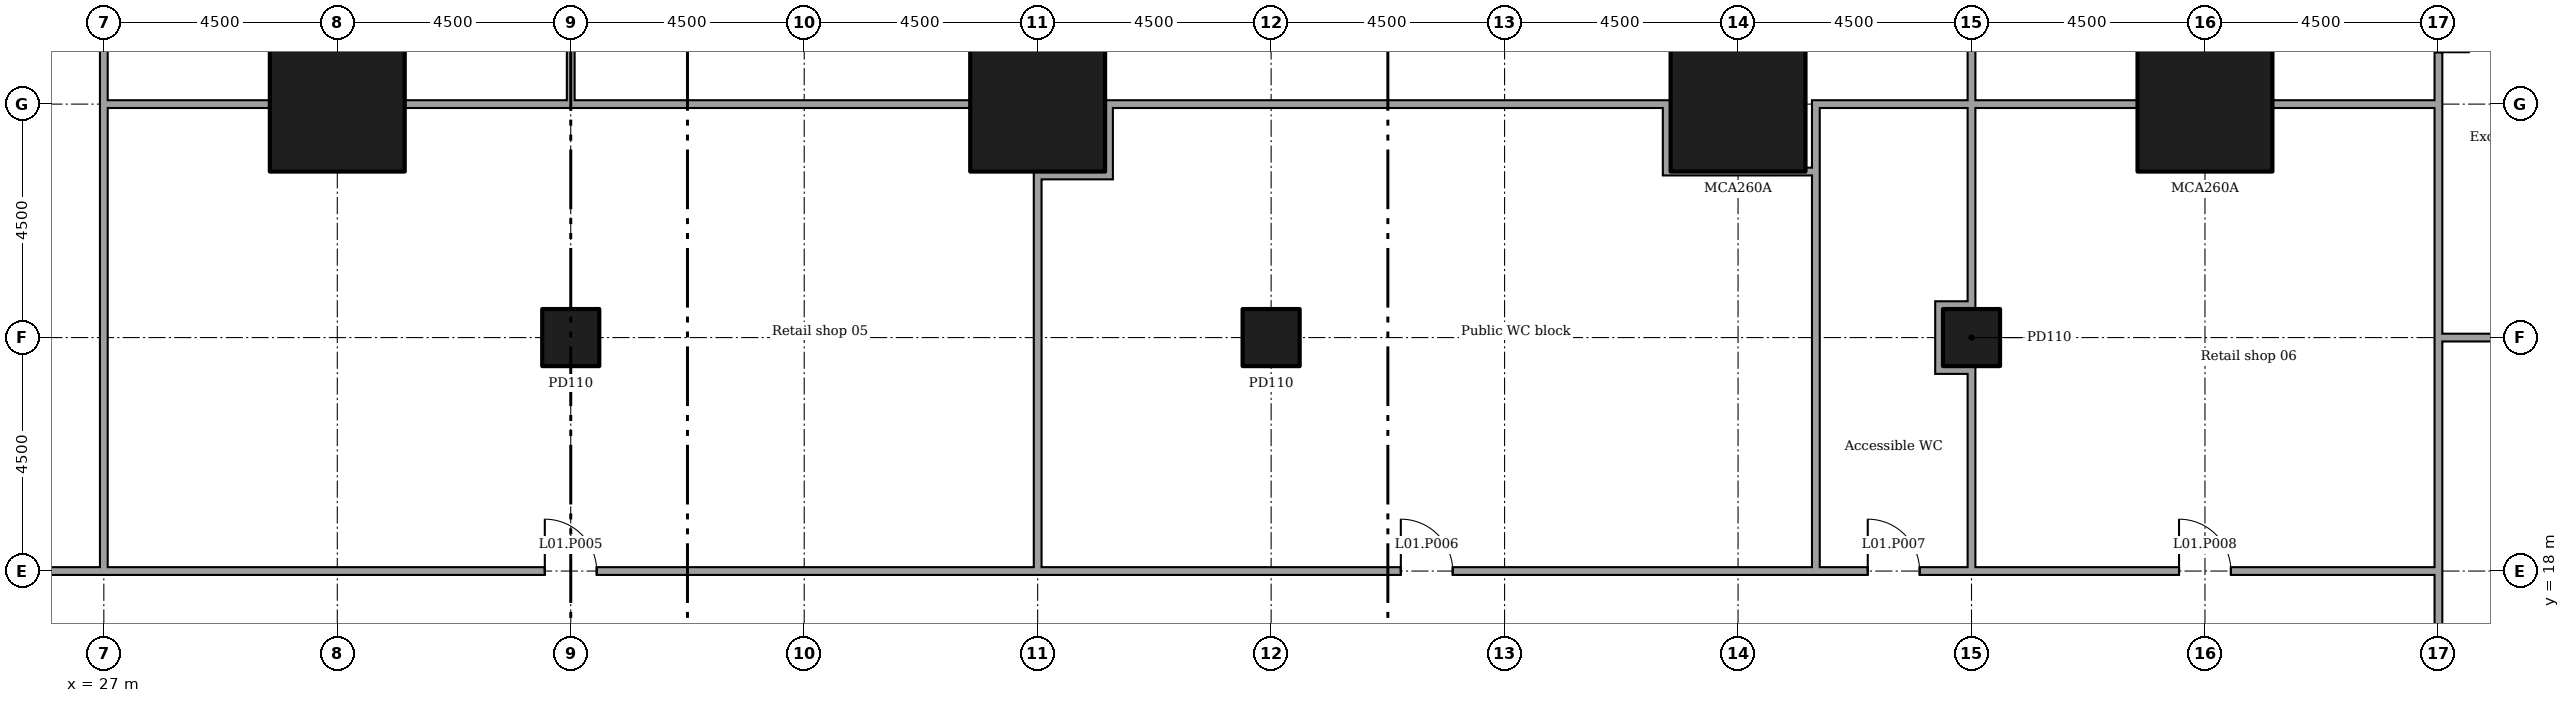
"""IFC4 building model, lengths in metres.
Left out: names, types, materials, properties, quantities, classifications, styles, units other than length and angle.
Written with IfcOpenShell. Run it as: python <this file> out.ifc"""

import sys

from ifc_helpers import new_model, si_unit, direction, frame, frame_2d, origin, origin_2d, place, context, subcontext, project, spatial, rectangle, extrude, element, fill, save


model = new_model("IFC4")
c1 = context("Model", 3, precision=1e-05, world=origin(), true_north=direction((0.0, 1.0)))
c2 = subcontext(c1, "Body", "Model", "MODEL_VIEW")
j1 = project(units=[si_unit("LENGTHUNIT", "METRE"), si_unit("PLANEANGLEUNIT", "RADIAN")], contexts=[c1])
p1 = place(None, origin())
s1 = spatial("IfcSite", under=j1, at=p1, CompositionType="ELEMENT")
p2 = place(p1, origin())
s2 = spatial("IfcBuilding", under=s1, at=p2, CompositionType="ELEMENT")
p3 = place(p2, frame((0.0, 0.0, 6.0)))
s3 = spatial("IfcBuildingStorey", under=s2, at=p3, CompositionType="ELEMENT", Elevation=6.0)
for number, where in (
    (1, (31.5, 27.0, 0.0)),
    (2, (45.0, 27.0, 0.0)),
    (3, (58.5, 27.0, 0.0)),
    (4, (67.5, 27.0, 0.0)),
):
    element("IfcColumn", number, at=place(p3, frame(where)), inside=s3, PredefinedType="COLUMN", context=c2, shape_type="SweptSolid", body=[
        extrude(rectangle(XDim=2.6, YDim=2.6, at=origin_2d()), origin(), (0.0, 0.0, 1.0), 5.5),
    ])
for number, where in (
    (5, (36.0, 22.5, 0.0)),
    (6, (49.5, 22.5, 0.0)),
    (7, (63.0, 22.5, 0.0)),
):
    element("IfcColumn", number, at=place(p3, frame(where)), inside=s3, PredefinedType="COLUMN", context=c2, shape_type="SweptSolid", body=[
        extrude(rectangle(XDim=1.1, YDim=1.1, at=origin_2d()), origin(), (0.0, 0.0, 1.0), 5.5),
    ])
p4 = place(p3, frame((72.0, 9.3, 0.0), z_axis=(0.0, 0.0, 1.0), x_axis=(0.0, 1.0, 0.0)))
e8 = element("IfcWall", 8, at=p4, inside=s3, PredefinedType="PARTITIONING", context=c2, shape_type="SweptSolid", body=[
    extrude(rectangle(XDim=8.775, YDim=0.15, at=frame_2d((4.387, 0.0))), origin(), (0.0, 0.0, 1.0), 5.05),
])
p5 = place(p4, frame((3.45, 0.0, 0.0)))
e9 = element("IfcOpeningElement", 9, at=p5, cuts=e8, PredefinedType="OPENING", context=c2, shape_type="SweptSolid", body=[
    extrude(rectangle(XDim=1.8, YDim=2.1, at=frame_2d((0.9, 1.05))), frame((0.0, 0.085, 0.0), z_axis=(0.0, -1.0, 0.0), x_axis=(1.0, 0.0, 0.0)), (0.0, 0.0, 1.0), 0.17),
])
p6 = place(p3, frame((72.0, 18.0, 0.0), z_axis=(0.0, 0.0, 1.0), x_axis=(0.0, 1.0, 0.0)))
e10 = element("IfcWall", 10, at=p6, inside=s3, PredefinedType="PARTITIONING", context=c2, shape_type="SweptSolid", body=[
    extrude(rectangle(XDim=4.575, YDim=0.15, at=frame_2d((2.288, 0.0))), origin(), (0.0, 0.0, 1.0), 5.05),
])
p7 = place(p3, frame((72.075, 22.5, 0.0)))
e11 = element("IfcWall", 11, at=p7, inside=s3, PredefinedType="PARTITIONING", context=c2, shape_type="SweptSolid", body=[
    extrude(rectangle(XDim=3.88, YDim=0.15, at=frame_2d((1.94, 0.0))), origin(), (0.0, 0.0, 1.0), 5.05),
])
p8 = place(p7, frame((1.325, 0.0, 0.0)))
e12 = element("IfcOpeningElement", 12, at=p8, cuts=e11, PredefinedType="OPENING", context=c2, shape_type="SweptSolid", body=[
    extrude(rectangle(XDim=1.2, YDim=2.1, at=frame_2d((0.6, 1.05))), frame((0.0, 0.085, 0.0), z_axis=(0.0, -1.0, 0.0), x_axis=(1.0, 0.0, 0.0)), (0.0, 0.0, 1.0), 0.17),
])
p9 = place(p3, frame((18.075, 18.0, 0.0)))
e13 = element("IfcWall", 13, at=p9, inside=s3, PredefinedType="PARTITIONING", context=c2, shape_type="SweptSolid", body=[
    extrude(rectangle(XDim=9.0, YDim=0.15, at=frame_2d((4.5, 0.0))), origin(), (0.0, 0.0, 1.0), 5.05),
])
p10 = place(p3, frame((27.0, 18.0, 0.0)))
e14 = element("IfcWall", 14, at=p10, inside=s3, PredefinedType="PARTITIONING", context=c2, shape_type="SweptSolid", body=[
    extrude(rectangle(XDim=18.075, YDim=0.15, at=frame_2d((9.038, 0.0))), origin(), (0.0, 0.0, 1.0), 5.05),
])
p11 = place(p10, frame((8.5, 0.0, 0.0)))
e15 = element("IfcOpeningElement", 15, at=p11, cuts=e14, PredefinedType="OPENING", context=c2, shape_type="SweptSolid", body=[
    extrude(rectangle(XDim=1.0, YDim=2.1, at=frame_2d((0.5, 1.05))), frame((0.0, 0.085, 0.0), z_axis=(0.0, -1.0, 0.0), x_axis=(1.0, 0.0, 0.0)), (0.0, 0.0, 1.0), 0.17),
])
p12 = place(p3, frame((45.0, 18.0, 0.0)))
e16 = element("IfcWall", 16, at=p12, inside=s3, PredefinedType="PARTITIONING", context=c2, shape_type="SweptSolid", body=[
    extrude(rectangle(XDim=15.075, YDim=0.15, at=frame_2d((7.538, 0.0))), origin(), (0.0, 0.0, 1.0), 5.05),
])
p13 = place(p12, frame((7.0, 0.0, 0.0)))
e17 = element("IfcOpeningElement", 17, at=p13, cuts=e16, PredefinedType="OPENING", context=c2, shape_type="SweptSolid", body=[
    extrude(rectangle(XDim=1.0, YDim=2.1, at=frame_2d((0.5, 1.05))), frame((0.0, 0.085, 0.0), z_axis=(0.0, -1.0, 0.0), x_axis=(1.0, 0.0, 0.0)), (0.0, 0.0, 1.0), 0.17),
])
p14 = place(p3, frame((60.0, 18.0, 0.0)))
e18 = element("IfcWall", 18, at=p14, inside=s3, PredefinedType="PARTITIONING", context=c2, shape_type="SweptSolid", body=[
    extrude(rectangle(XDim=3.075, YDim=0.15, at=frame_2d((1.538, 0.0))), origin(), (0.0, 0.0, 1.0), 5.05),
])
p15 = place(p14, frame((1.0, 0.0, 0.0)))
e19 = element("IfcOpeningElement", 19, at=p15, cuts=e18, PredefinedType="OPENING", context=c2, shape_type="SweptSolid", body=[
    extrude(rectangle(XDim=1.0, YDim=2.1, at=frame_2d((0.5, 1.05))), frame((0.0, 0.085, 0.0), z_axis=(0.0, -1.0, 0.0), x_axis=(1.0, 0.0, 0.0)), (0.0, 0.0, 1.0), 0.17),
])
p16 = place(p3, frame((63.0, 18.0, 0.0)))
e20 = element("IfcWall", 20, at=p16, inside=s3, PredefinedType="PARTITIONING", context=c2, shape_type="SweptSolid", body=[
    extrude(rectangle(XDim=8.925, YDim=0.15, at=frame_2d((4.462, 0.0))), origin(), (0.0, 0.0, 1.0), 5.05),
])
p17 = place(p16, frame((4.0, 0.0, 0.0)))
e21 = element("IfcOpeningElement", 21, at=p17, cuts=e20, PredefinedType="OPENING", context=c2, shape_type="SweptSolid", body=[
    extrude(rectangle(XDim=1.0, YDim=2.1, at=frame_2d((0.5, 1.05))), frame((0.0, 0.085, 0.0), z_axis=(0.0, -1.0, 0.0), x_axis=(1.0, 0.0, 0.0)), (0.0, 0.0, 1.0), 0.17),
])
p18 = place(p3, frame((27.0, 18.075, 0.0), z_axis=(0.0, 0.0, 1.0), x_axis=(0.0, 1.0, 0.0)))
e22 = element("IfcWall", 22, at=p18, inside=s3, PredefinedType="PARTITIONING", context=c2, shape_type="SweptSolid", body=[
    extrude(rectangle(XDim=9.0, YDim=0.15, at=frame_2d((4.5, 0.0))), origin(), (0.0, 0.0, 1.0), 5.05),
])
p19 = place(p3, frame((27.0, 27.0, 0.0), z_axis=(0.0, 0.0, 1.0), x_axis=(0.0, 1.0, 0.0)))
e23 = element("IfcWall", 23, at=p19, inside=s3, PredefinedType="PARTITIONING", context=c2, shape_type="SweptSolid", body=[
    extrude(rectangle(XDim=3.205, YDim=0.15, at=frame_2d((1.603, 0.0))), origin(), (0.0, 0.0, 1.0), 5.05),
])
p20 = place(p3, frame((45.0, 18.075, 0.0), z_axis=(0.0, 0.0, 1.0), x_axis=(0.0, 1.0, 0.0)))
e24 = element("IfcWall", 24, at=p20, inside=s3, PredefinedType="PARTITIONING", context=c2, shape_type="SweptSolid", body=[
    extrude(rectangle(XDim=7.625, YDim=0.15, at=frame_2d((3.812, 0.0))), origin(), (0.0, 0.0, 1.0), 5.05),
])
p21 = place(p3, frame((27.075, 27.0, 0.0)))
e25 = element("IfcWall", 25, at=p21, inside=s3, PredefinedType="PARTITIONING", context=c2, shape_type="SweptSolid", body=[
    extrude(rectangle(XDim=3.13, YDim=0.15, at=frame_2d((1.565, 0.0))), origin(), (0.0, 0.0, 1.0), 5.05),
])
p22 = place(p3, frame((32.795, 27.0, 0.0)))
e26 = element("IfcWall", 26, at=p22, inside=s3, PredefinedType="PARTITIONING", context=c2, shape_type="SweptSolid", body=[
    extrude(rectangle(XDim=3.28, YDim=0.15, at=frame_2d((1.64, 0.0))), origin(), (0.0, 0.0, 1.0), 5.05),
])
p23 = place(p3, frame((36.0, 27.0, 0.0)))
e27 = element("IfcWall", 27, at=p23, inside=s3, PredefinedType="PARTITIONING", context=c2, shape_type="SweptSolid", body=[
    extrude(rectangle(XDim=7.705, YDim=0.15, at=frame_2d((3.853, 0.0))), origin(), (0.0, 0.0, 1.0), 5.05),
])
p24 = place(p3, frame((60.0, 18.075, 0.0), z_axis=(0.0, 0.0, 1.0), x_axis=(0.0, 1.0, 0.0)))
e28 = element("IfcWall", 28, at=p24, inside=s3, PredefinedType="PARTITIONING", context=c2, shape_type="SweptSolid", body=[
    extrude(rectangle(XDim=7.7, YDim=0.15, at=frame_2d((3.85, 0.0))), origin(), (0.0, 0.0, 1.0), 5.05),
])
p25 = place(p3, frame((46.375, 25.55, 0.0), z_axis=(0.0, 0.0, 1.0), x_axis=(0.0, 1.0, 0.0)))
e29 = element("IfcWall", 29, at=p25, inside=s3, PredefinedType="PARTITIONING", context=c2, shape_type="SweptSolid", body=[
    extrude(rectangle(XDim=1.525, YDim=0.15, at=frame_2d((0.762, 0.0))), origin(), (0.0, 0.0, 1.0), 5.05),
])
p26 = place(p3, frame((57.125, 25.625, 0.0), z_axis=(0.0, 0.0, 1.0), x_axis=(0.0, 1.0, 0.0)))
e30 = element("IfcWall", 30, at=p26, inside=s3, PredefinedType="PARTITIONING", context=c2, shape_type="SweptSolid", body=[
    extrude(rectangle(XDim=1.45, YDim=0.15, at=frame_2d((0.725, 0.0))), origin(), (0.0, 0.0, 1.0), 5.05),
])
p27 = place(p3, frame((45.075, 25.625, 0.0)))
e31 = element("IfcWall", 31, at=p27, inside=s3, PredefinedType="PARTITIONING", context=c2, shape_type="SweptSolid", body=[
    extrude(rectangle(XDim=1.225, YDim=0.15, at=frame_2d((0.613, 0.0))), origin(), (0.0, 0.0, 1.0), 5.05),
])
p28 = place(p3, frame((57.2, 25.7, 0.0)))
e32 = element("IfcWall", 32, at=p28, inside=s3, PredefinedType="PARTITIONING", context=c2, shape_type="SweptSolid", body=[
    extrude(rectangle(XDim=2.725, YDim=0.15, at=frame_2d((1.363, 0.0))), origin(), (0.0, 0.0, 1.0), 5.05),
])
p29 = place(p3, frame((46.45, 27.0, 0.0)))
e33 = element("IfcWall", 33, at=p29, inside=s3, PredefinedType="PARTITIONING", context=c2, shape_type="SweptSolid", body=[
    extrude(rectangle(XDim=10.6, YDim=0.15, at=frame_2d((5.3, 0.0))), origin(), (0.0, 0.0, 1.0), 5.05),
])
p30 = place(p3, frame((62.375, 21.8, 0.0), z_axis=(0.0, 0.0, 1.0), x_axis=(0.0, 1.0, 0.0)))
e34 = element("IfcWall", 34, at=p30, inside=s3, PredefinedType="PARTITIONING", context=c2, shape_type="SweptSolid", body=[
    extrude(rectangle(XDim=1.4, YDim=0.15, at=frame_2d((0.7, 0.0))), origin(), (0.0, 0.0, 1.0), 5.05),
])
p31 = place(p3, frame((63.0, 18.075, 0.0), z_axis=(0.0, 0.0, 1.0), x_axis=(0.0, 1.0, 0.0)))
e35 = element("IfcWall", 35, at=p31, inside=s3, PredefinedType="PARTITIONING", context=c2, shape_type="SweptSolid", body=[
    extrude(rectangle(XDim=3.875, YDim=0.15, at=frame_2d((1.938, 0.0))), origin(), (0.0, 0.0, 1.0), 5.05),
])
p32 = place(p3, frame((63.0, 23.05, 0.0), z_axis=(0.0, 0.0, 1.0), x_axis=(0.0, 1.0, 0.0)))
e36 = element("IfcWall", 36, at=p32, inside=s3, PredefinedType="PARTITIONING", context=c2, shape_type="SweptSolid", body=[
    extrude(rectangle(XDim=4.025, YDim=0.15, at=frame_2d((2.012, 0.0))), origin(), (0.0, 0.0, 1.0), 5.05),
])
for number, where in (
    (37, (62.45, 21.875, 0.0)),
    (38, (62.45, 23.125, 0.0)),
):
    element("IfcWall", number, at=place(p3, frame(where)), inside=s3, PredefinedType="PARTITIONING", context=c2, shape_type="SweptSolid", body=[
        extrude(rectangle(XDim=0.475, YDim=0.15, at=frame_2d((0.238, 0.0))), origin(), (0.0, 0.0, 1.0), 5.05),
    ])
p33 = place(p3, frame((60.0, 25.7, 0.0), z_axis=(0.0, 0.0, 1.0), x_axis=(0.0, 1.0, 0.0)))
e39 = element("IfcWall", 39, at=p33, inside=s3, PredefinedType="PARTITIONING", context=c2, shape_type="SweptSolid", body=[
    extrude(rectangle(XDim=1.375, YDim=0.15, at=frame_2d((0.688, 0.0))), origin(), (0.0, 0.0, 1.0), 5.05),
])
p34 = place(p3, frame((60.075, 27.0, 0.0)))
e40 = element("IfcWall", 40, at=p34, inside=s3, PredefinedType="PARTITIONING", context=c2, shape_type="SweptSolid", body=[
    extrude(rectangle(XDim=3.0, YDim=0.15, at=frame_2d((1.5, 0.0))), origin(), (0.0, 0.0, 1.0), 5.05),
])
p35 = place(p3, frame((63.075, 27.0, 0.0)))
e41 = element("IfcWall", 41, at=p35, inside=s3, PredefinedType="PARTITIONING", context=c2, shape_type="SweptSolid", body=[
    extrude(rectangle(XDim=3.13, YDim=0.15, at=frame_2d((1.565, 0.0))), origin(), (0.0, 0.0, 1.0), 5.05),
])
p36 = place(p3, frame((68.795, 27.0, 0.0)))
e42 = element("IfcWall", 42, at=p36, inside=s3, PredefinedType="PARTITIONING", context=c2, shape_type="SweptSolid", body=[
    extrude(rectangle(XDim=3.28, YDim=0.15, at=frame_2d((1.64, 0.0))), origin(), (0.0, 0.0, 1.0), 5.05),
])
p37 = place(p3, frame((72.0, 22.5, 0.0), z_axis=(0.0, 0.0, 1.0), x_axis=(0.0, 1.0, 0.0)))
e43 = element("IfcWall", 43, at=p37, inside=s3, PredefinedType="PARTITIONING", context=c2, shape_type="SweptSolid", body=[
    extrude(rectangle(XDim=4.425, YDim=0.15, at=frame_2d((2.212, 0.0))), origin(), (0.0, 0.0, 1.0), 5.05),
])
p38 = place(p3, frame((63.0, 27.075, 0.0), z_axis=(0.0, 0.0, 1.0), x_axis=(0.0, 1.0, 0.0)))
e44 = element("IfcWall", 44, at=p38, inside=s3, PredefinedType="PARTITIONING", context=c2, shape_type="SweptSolid", body=[
    extrude(rectangle(XDim=9.0, YDim=0.15, at=frame_2d((4.5, 0.0))), origin(), (0.0, 0.0, 1.0), 5.05),
])
p39 = place(p3, frame((72.0, 27.0, 0.0), z_axis=(0.0, 0.0, 1.0), x_axis=(0.0, 1.0, 0.0)))
e45 = element("IfcWall", 45, at=p39, inside=s3, PredefinedType="PARTITIONING", context=c2, shape_type="SweptSolid", body=[
    extrude(rectangle(XDim=3.205, YDim=0.15, at=frame_2d((1.603, 0.0))), origin(), (0.0, 0.0, 1.0), 5.05),
])
p40 = place(p39, frame((1.0, 0.0, 0.0)))
e46 = element("IfcOpeningElement", 46, at=p40, cuts=e45, PredefinedType="OPENING", context=c2, shape_type="SweptSolid", body=[
    extrude(rectangle(XDim=1.2, YDim=2.1, at=frame_2d((0.6, 1.05))), frame((0.0, 0.085, 0.0), z_axis=(0.0, -1.0, 0.0), x_axis=(1.0, 0.0, 0.0)), (0.0, 0.0, 1.0), 0.17),
])
p41 = place(p3, frame((36.0, 27.075, 0.0), z_axis=(0.0, 0.0, 1.0), x_axis=(0.0, 1.0, 0.0)))
e47 = element("IfcWall", 47, at=p41, inside=s3, PredefinedType="PARTITIONING", context=c2, shape_type="SweptSolid", body=[
    extrude(rectangle(XDim=9.0, YDim=0.15, at=frame_2d((4.5, 0.0))), origin(), (0.0, 0.0, 1.0), 5.05),
])
p42 = place(p11, origin())
e48 = element("IfcDoor", 48, at=p42, inside=s3, OperationType="SINGLE_SWING_RIGHT", PredefinedType="DOOR", context=c2, shape_type="SweptSolid", body=[
    extrude(rectangle(XDim=1.0, YDim=2.1, at=frame_2d((0.5, 1.05))), frame((0.0, 0.025, 0.0), z_axis=(0.0, -1.0, 0.0), x_axis=(1.0, 0.0, 0.0)), (0.0, 0.0, 1.0), 0.05),
])
fill(e15, e48)
p43 = place(p13, origin())
e49 = element("IfcDoor", 49, at=p43, inside=s3, OperationType="SINGLE_SWING_RIGHT", PredefinedType="DOOR", context=c2, shape_type="SweptSolid", body=[
    extrude(rectangle(XDim=1.0, YDim=2.1, at=frame_2d((0.5, 1.05))), frame((0.0, 0.025, 0.0), z_axis=(0.0, -1.0, 0.0), x_axis=(1.0, 0.0, 0.0)), (0.0, 0.0, 1.0), 0.05),
])
fill(e17, e49)
p44 = place(p15, origin())
e50 = element("IfcDoor", 50, at=p44, inside=s3, OperationType="SINGLE_SWING_RIGHT", PredefinedType="DOOR", context=c2, shape_type="SweptSolid", body=[
    extrude(rectangle(XDim=1.0, YDim=2.1, at=frame_2d((0.5, 1.05))), frame((0.0, 0.025, 0.0), z_axis=(0.0, -1.0, 0.0), x_axis=(1.0, 0.0, 0.0)), (0.0, 0.0, 1.0), 0.05),
])
fill(e19, e50)
p45 = place(p17, origin())
e51 = element("IfcDoor", 51, at=p45, inside=s3, OperationType="SINGLE_SWING_RIGHT", PredefinedType="DOOR", context=c2, shape_type="SweptSolid", body=[
    extrude(rectangle(XDim=1.0, YDim=2.1, at=frame_2d((0.5, 1.05))), frame((0.0, 0.025, 0.0), z_axis=(0.0, -1.0, 0.0), x_axis=(1.0, 0.0, 0.0)), (0.0, 0.0, 1.0), 0.05),
])
fill(e21, e51)
p46 = place(p40, frame((1.2, 0.0, 0.0), x_axis=(-1.0, 0.0, 0.0)))
e52 = element("IfcDoor", 52, at=p46, inside=s3, OperationType="DOUBLE_DOOR_SINGLE_SWING", PredefinedType="DOOR", context=c2, shape_type="SweptSolid", body=[
    extrude(rectangle(XDim=1.2, YDim=2.1, at=frame_2d((0.6, 1.05))), frame((0.0, 0.025, 0.0), z_axis=(0.0, -1.0, 0.0), x_axis=(1.0, 0.0, 0.0)), (0.0, 0.0, 1.0), 0.05),
])
fill(e46, e52)
save(model, sys.argv[1])
